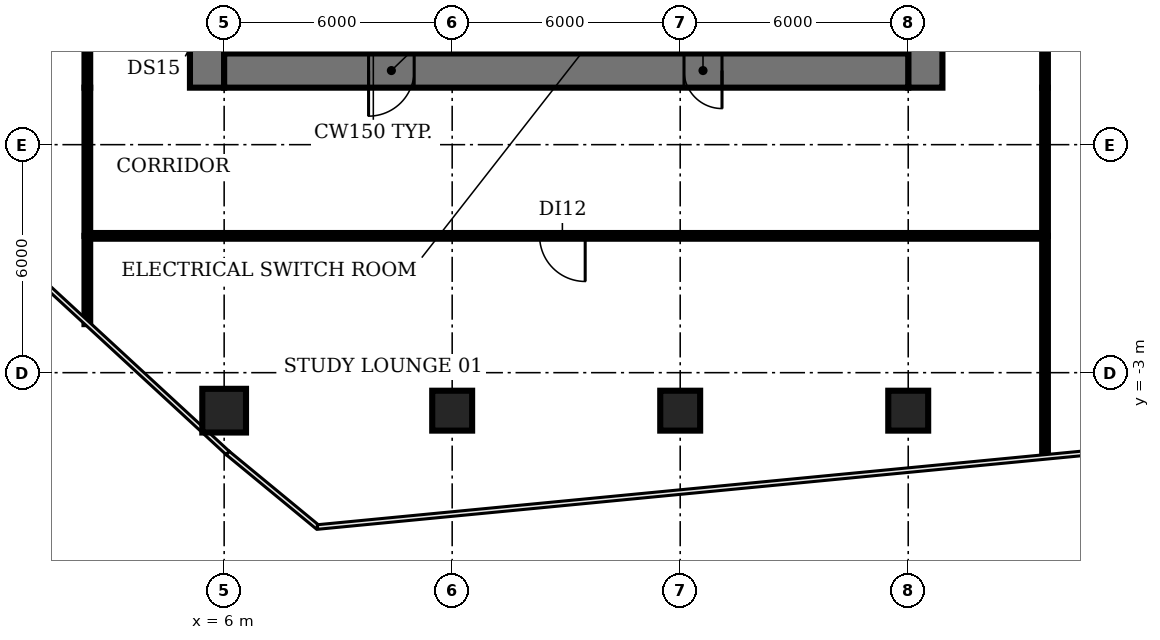
"""IFC4 building model, lengths in metres.
Left out: names, types, materials, properties, quantities, classifications, styles, units other than length and angle.
Written with IfcOpenShell. Run it as: python <this file> out.ifc"""

import sys

from ifc_helpers import new_model, si_unit, direction, frame, frame_2d, origin, origin_2d, place, context, subcontext, project, spatial, rectangle, circle, extrude, element, fill, save


model = new_model("IFC4")
c1 = context("Model", 3, precision=1e-05, world=origin(), true_north=direction((0.0, 1.0)))
c2 = subcontext(c1, "Body", "Model", "MODEL_VIEW")
j1 = project(units=[si_unit("LENGTHUNIT", "METRE"), si_unit("PLANEANGLEUNIT", "RADIAN")], contexts=[c1])
p1 = place(None, origin())
s1 = spatial("IfcSite", under=j1, at=p1, CompositionType="ELEMENT")
p2 = place(p1, origin())
s2 = spatial("IfcBuilding", under=s1, at=p2, CompositionType="ELEMENT")
p3 = place(p2, frame((0.0, 0.0, 75.2)))
s3 = spatial("IfcBuildingStorey", under=s2, at=p3, CompositionType="ELEMENT", Elevation=75.2)
p4 = place(p3, frame((6.0, -4.0, 0.0), z_axis=(0.0, 0.0, 1.0), x_axis=(1.0, 0.0, 0.0)))
e1 = element("IfcColumn", 1, at=p4, inside=s3, PredefinedType="COLUMN", context=c2, shape_type="SweptSolid", body=[
    extrude(circle(Radius=0.575, at=origin_2d()), origin(), (0.0, 0.0, 1.0), 3.2),
])
for number, where, z_axis, x_axis in (
    (2, (12.0, -4.0, 0.0), (0.0, 0.0, 1.0), (1.0, 0.0, 0.0)),
    (3, (18.0, -4.0, 0.0), (0.0, 0.0, 1.0), (1.0, 0.0, 0.0)),
    (4, (24.0, -4.0, 0.0), (0.0, 0.0, 1.0), (1.0, 0.0, 0.0)),
):
    element("IfcColumn", number, at=place(p3, frame(where, z_axis=z_axis, x_axis=x_axis)), inside=s3, PredefinedType="COLUMN", context=c2, shape_type="SweptSolid", body=[
        extrude(rectangle(XDim=1.05, YDim=1.05, at=origin_2d()), origin(), (0.0, 0.0, 1.0), 3.2),
    ])
p5 = place(p3, frame((9.275, 11.825, 0.0), z_axis=(0.0, 0.0, 1.0), x_axis=(0.0, -1.0, 0.0)))
e5 = element("IfcWall", 5, at=p5, inside=s3, PredefinedType="SHEAR", context=c2, shape_type="SweptSolid", body=[
    extrude(rectangle(XDim=6.425, YDim=0.25, at=frame_2d((3.212, 0.0))), origin(), (0.0, 0.0, 1.0), 3.8),
])
p6 = place(p5, frame((5.075, 0.0, 0.0)))
e6 = element("IfcOpeningElement", 6, at=p6, cuts=e5, PredefinedType="OPENING", context=c2, shape_type="SweptSolid", body=[
    extrude(rectangle(XDim=1.0, YDim=2.1, at=frame_2d((0.5, 1.05))), frame((0.0, 0.135, 0.0), z_axis=(0.0, -1.0, 0.0), x_axis=(1.0, 0.0, 0.0)), (0.0, 0.0, 1.0), 0.27),
])
p7 = place(p3, frame((13.5, 5.4, 0.0), z_axis=(0.0, 0.0, 1.0), x_axis=(0.0, 1.0, 0.0)))
e7 = element("IfcWall", 7, at=p7, inside=s3, PredefinedType="SHEAR", context=c2, shape_type="SweptSolid", body=[
    extrude(rectangle(XDim=8.2, YDim=0.2, at=frame_2d((4.1, 0.0))), origin(), (0.0, 0.0, 1.0), 3.8),
])
p8 = place(p7, frame((0.75, 0.0, 0.0)))
e8 = element("IfcOpeningElement", 8, at=p8, cuts=e7, PredefinedType="OPENING", context=c2, shape_type="SweptSolid", body=[
    extrude(rectangle(XDim=1.1, YDim=2.1, at=frame_2d((0.55, 1.05))), frame((0.0, 0.11, 0.0), z_axis=(0.0, -1.0, 0.0), x_axis=(1.0, 0.0, 0.0)), (0.0, 0.0, 1.0), 0.22),
])
p9 = place(p7, frame((3.55, 0.0, 0.0)))
e9 = element("IfcOpeningElement", 9, at=p9, cuts=e7, PredefinedType="OPENING", context=c2, shape_type="SweptSolid", body=[
    extrude(rectangle(XDim=1.1, YDim=2.1, at=frame_2d((0.55, 1.05))), frame((0.0, 0.11, 0.0), z_axis=(0.0, -1.0, 0.0), x_axis=(1.0, 0.0, 0.0)), (0.0, 0.0, 1.0), 0.22),
])
p10 = place(p7, frame((6.35, 0.0, 0.0)))
e10 = element("IfcOpeningElement", 10, at=p10, cuts=e7, PredefinedType="OPENING", context=c2, shape_type="SweptSolid", body=[
    extrude(rectangle(XDim=1.1, YDim=2.1, at=frame_2d((0.55, 1.05))), frame((0.0, 0.11, 0.0), z_axis=(0.0, -1.0, 0.0), x_axis=(1.0, 0.0, 0.0)), (0.0, 0.0, 1.0), 0.22),
])
p11 = place(p3, frame((16.5, 5.4, 0.0), z_axis=(0.0, 0.0, 1.0), x_axis=(0.0, 1.0, 0.0)))
e11 = element("IfcWall", 11, at=p11, inside=s3, PredefinedType="SHEAR", context=c2, shape_type="SweptSolid", body=[
    extrude(rectangle(XDim=8.2, YDim=0.2, at=frame_2d((4.1, 0.0))), origin(), (0.0, 0.0, 1.0), 3.8),
])
p12 = place(p3, frame((20.725, 5.4, 0.0), z_axis=(0.0, 0.0, 1.0), x_axis=(0.0, 1.0, 0.0)))
e12 = element("IfcWall", 12, at=p12, inside=s3, PredefinedType="SHEAR", context=c2, shape_type="SweptSolid", body=[
    extrude(rectangle(XDim=6.3, YDim=0.25, at=frame_2d((3.15, 0.0))), origin(), (0.0, 0.0, 1.0), 3.8),
])
p13 = place(p3, frame((5.55, 4.5, 0.0), z_axis=(0.0, 0.0, 1.0), x_axis=(0.0, 1.0, 0.0)))
e13 = element("IfcWall", 13, at=p13, inside=s3, PredefinedType="SHEAR", context=c2, shape_type="SweptSolid", body=[
    extrude(rectangle(XDim=21.2, YDim=0.9, at=frame_2d((10.6, 0.0))), origin(), (0.0, 0.0, 1.0), 3.8),
])
p14 = place(p13, frame((1.15, 0.0, 0.0)))
e14 = element("IfcOpeningElement", 14, at=p14, cuts=e13, PredefinedType="OPENING", context=c2, shape_type="SweptSolid", body=[
    extrude(rectangle(XDim=1.5, YDim=2.1, at=frame_2d((0.75, 1.05))), frame((0.0, 0.46, 0.0), z_axis=(0.0, -1.0, 0.0), x_axis=(1.0, 0.0, 0.0)), (0.0, 0.0, 1.0), 0.92),
])
p15 = place(p13, frame((7.6, 0.0, 0.0)))
e15 = element("IfcOpeningElement", 15, at=p15, cuts=e13, PredefinedType="OPENING", context=c2, shape_type="SweptSolid", body=[
    extrude(rectangle(XDim=1.2, YDim=2.1, at=frame_2d((0.6, 1.05))), frame((0.0, 0.46, 0.0), z_axis=(0.0, -1.0, 0.0), x_axis=(1.0, 0.0, 0.0)), (0.0, 0.0, 1.0), 0.92),
])
p16 = place(p13, frame((14.15, 0.0, 0.0)))
e16 = element("IfcOpeningElement", 16, at=p16, cuts=e13, PredefinedType="OPENING", context=c2, shape_type="SweptSolid", body=[
    extrude(rectangle(XDim=1.2, YDim=2.1, at=frame_2d((0.6, 1.05))), frame((0.0, 0.46, 0.0), z_axis=(0.0, -1.0, 0.0), x_axis=(1.0, 0.0, 0.0)), (0.0, 0.0, 1.0), 0.92),
])
p17 = place(p3, frame((24.45, 25.7, 0.0), z_axis=(0.0, 0.0, 1.0), x_axis=(0.0, -1.0, 0.0)))
e17 = element("IfcWall", 17, at=p17, inside=s3, PredefinedType="SHEAR", context=c2, shape_type="SweptSolid", body=[
    extrude(rectangle(XDim=21.2, YDim=0.9, at=frame_2d((10.6, 0.0))), origin(), (0.0, 0.0, 1.0), 3.8),
])
p18 = place(p17, frame((18.55, 0.0, 0.0)))
e18 = element("IfcOpeningElement", 18, at=p18, cuts=e17, PredefinedType="OPENING", context=c2, shape_type="SweptSolid", body=[
    extrude(rectangle(XDim=1.5, YDim=2.1, at=frame_2d((0.75, 1.05))), frame((0.0, 0.46, 0.0), z_axis=(0.0, -1.0, 0.0), x_axis=(1.0, 0.0, 0.0)), (0.0, 0.0, 1.0), 0.92),
])
p19 = place(p17, frame((12.45, 0.0, 0.0)))
e19 = element("IfcOpeningElement", 19, at=p19, cuts=e17, PredefinedType="OPENING", context=c2, shape_type="SweptSolid", body=[
    extrude(rectangle(XDim=0.9, YDim=2.1, at=frame_2d((0.45, 1.05))), frame((0.0, 0.46, 0.0), z_axis=(0.0, -1.0, 0.0), x_axis=(1.0, 0.0, 0.0)), (0.0, 0.0, 1.0), 0.92),
])
p20 = place(p17, frame((6.45, 0.0, 0.0)))
e20 = element("IfcOpeningElement", 20, at=p20, cuts=e17, PredefinedType="OPENING", context=c2, shape_type="SweptSolid", body=[
    extrude(rectangle(XDim=2.0, YDim=2.1, at=frame_2d((1.0, 1.05))), frame((0.0, 0.46, 0.0), z_axis=(0.0, -1.0, 0.0), x_axis=(1.0, 0.0, 0.0)), (0.0, 0.0, 1.0), 0.92),
])
p21 = place(p3, frame((24.0, 4.95, 0.0), z_axis=(0.0, 0.0, 1.0), x_axis=(-1.0, 0.0, 0.0)))
e21 = element("IfcWall", 21, at=p21, inside=s3, PredefinedType="SHEAR", context=c2, shape_type="SweptSolid", body=[
    extrude(rectangle(XDim=18.0, YDim=0.9, at=frame_2d((9.0, 0.0))), origin(), (0.0, 0.0, 1.0), 3.8),
])
p22 = place(p21, frame((13.0, 0.0, 0.0)))
e22 = element("IfcOpeningElement", 22, at=p22, cuts=e21, PredefinedType="OPENING", context=c2, shape_type="SweptSolid", body=[
    extrude(rectangle(XDim=1.2, YDim=2.1, at=frame_2d((0.6, 1.05))), frame((0.0, 0.46, 0.0), z_axis=(0.0, -1.0, 0.0), x_axis=(1.0, 0.0, 0.0)), (0.0, 0.0, 1.0), 0.92),
])
p23 = place(p21, frame((4.9, 0.0, 0.0)))
e23 = element("IfcOpeningElement", 23, at=p23, cuts=e21, PredefinedType="OPENING", context=c2, shape_type="SweptSolid", body=[
    extrude(rectangle(XDim=1.0, YDim=2.1, at=frame_2d((0.5, 1.05))), frame((0.0, 0.46, 0.0), z_axis=(0.0, -1.0, 0.0), x_axis=(1.0, 0.0, 0.0)), (0.0, 0.0, 1.0), 0.92),
])
p24 = place(p3, frame((2.4, -1.723, 0.0), z_axis=(0.0, 0.0, 1.0), x_axis=(0.0, 1.0, 0.0)))
e24 = element("IfcWall", 24, at=p24, inside=s3, PredefinedType="PARTITIONING", context=c2, shape_type="SweptSolid", body=[
    extrude(rectangle(XDim=2.323, YDim=0.15, at=frame_2d((1.161, 0.0))), origin(), (0.0, 0.0, 1.0), 2.78),
])
p25 = place(p3, frame((2.4, 0.6, 0.0), z_axis=(0.0, 0.0, 1.0), x_axis=(0.0, 1.0, 0.0)))
e25 = element("IfcWall", 25, at=p25, inside=s3, PredefinedType="PARTITIONING", context=c2, shape_type="SweptSolid", body=[
    extrude(rectangle(XDim=3.9, YDim=0.15, at=frame_2d((1.95, 0.0))), origin(), (0.0, 0.0, 1.0), 2.78),
])
p26 = place(p3, frame((2.4, 4.5, 0.0), z_axis=(0.0, 0.0, 1.0), x_axis=(0.0, 1.0, 0.0)))
e26 = element("IfcWall", 26, at=p26, inside=s3, PredefinedType="PARTITIONING", context=c2, shape_type="SweptSolid", body=[
    extrude(rectangle(XDim=21.2, YDim=0.15, at=frame_2d((10.6, 0.0))), origin(), (0.0, 0.0, 1.0), 2.78),
])
p27 = place(p26, frame((10.8, 0.0, 0.0)))
e27 = element("IfcOpeningElement", 27, at=p27, cuts=e26, PredefinedType="OPENING", context=c2, shape_type="SweptSolid", body=[
    extrude(rectangle(XDim=1.2, YDim=2.1, at=frame_2d((0.6, 1.05))), frame((0.0, 0.085, 0.0), z_axis=(0.0, -1.0, 0.0), x_axis=(1.0, 0.0, 0.0)), (0.0, 0.0, 1.0), 0.17),
])
p28 = place(p3, frame((27.6, -5.17, 0.0), z_axis=(0.0, 0.0, 1.0), x_axis=(0.0, 1.0, 0.0)))
e28 = element("IfcWall", 28, at=p28, inside=s3, PredefinedType="PARTITIONING", context=c2, shape_type="SweptSolid", body=[
    extrude(rectangle(XDim=5.77, YDim=0.15, at=frame_2d((2.885, 0.0))), origin(), (0.0, 0.0, 1.0), 2.78),
])
p29 = place(p3, frame((27.6, 0.6, 0.0), z_axis=(0.0, 0.0, 1.0), x_axis=(-1.0, 0.0, 0.0)))
e29 = element("IfcWall", 29, at=p29, inside=s3, PredefinedType="PARTITIONING", context=c2, shape_type="SweptSolid", body=[
    extrude(rectangle(XDim=25.2, YDim=0.15, at=frame_2d((12.6, 0.0))), origin(), (0.0, 0.0, 1.0), 2.78),
])
p30 = place(p29, frame((12.1, 0.0, 0.0)))
e30 = element("IfcOpeningElement", 30, at=p30, cuts=e29, PredefinedType="OPENING", context=c2, shape_type="SweptSolid", body=[
    extrude(rectangle(XDim=1.2, YDim=2.1, at=frame_2d((0.6, 1.05))), frame((0.0, 0.085, 0.0), z_axis=(0.0, -1.0, 0.0), x_axis=(1.0, 0.0, 0.0)), (0.0, 0.0, 1.0), 0.17),
])
p31 = place(p3, frame((27.6, 0.6, 0.0), z_axis=(0.0, 0.0, 1.0), x_axis=(0.0, 1.0, 0.0)))
e31 = element("IfcWall", 31, at=p31, inside=s3, PredefinedType="PARTITIONING", context=c2, shape_type="SweptSolid", body=[
    extrude(rectangle(XDim=3.9, YDim=0.15, at=frame_2d((1.95, 0.0))), origin(), (0.0, 0.0, 1.0), 2.78),
])
p32 = place(p3, frame((27.6, 15.0, 0.0), z_axis=(0.0, 0.0, 1.0), x_axis=(0.0, -1.0, 0.0)))
e32 = element("IfcWall", 32, at=p32, inside=s3, PredefinedType="PARTITIONING", context=c2, shape_type="SweptSolid", body=[
    extrude(rectangle(XDim=10.5, YDim=0.15, at=frame_2d((5.25, 0.0))), origin(), (0.0, 0.0, 1.0), 2.78),
])
p33 = place(p32, frame((4.8, 0.0, 0.0)))
e33 = element("IfcOpeningElement", 33, at=p33, cuts=e32, PredefinedType="OPENING", context=c2, shape_type="SweptSolid", body=[
    extrude(rectangle(XDim=1.0, YDim=2.1, at=frame_2d((0.5, 1.05))), frame((0.0, 0.085, 0.0), z_axis=(0.0, -1.0, 0.0), x_axis=(1.0, 0.0, 0.0)), (0.0, 0.0, 1.0), 0.17),
])
p34 = place(p22, origin())
e34 = element("IfcDoor", 34, at=p34, inside=s3, OperationType="SINGLE_SWING_RIGHT", PredefinedType="DOOR", context=c2, shape_type="SweptSolid", body=[
    extrude(rectangle(XDim=1.2, YDim=2.1, at=frame_2d((0.6, 1.05))), frame((0.0, 0.025, 0.0), z_axis=(0.0, -1.0, 0.0), x_axis=(1.0, 0.0, 0.0)), (0.0, 0.0, 1.0), 0.05),
])
fill(e22, e34)
p35 = place(p23, origin())
e35 = element("IfcDoor", 35, at=p35, inside=s3, OperationType="SINGLE_SWING_LEFT", PredefinedType="DOOR", context=c2, shape_type="SweptSolid", body=[
    extrude(rectangle(XDim=1.0, YDim=2.1, at=frame_2d((0.5, 1.05))), frame((0.0, -0.39, 0.0), z_axis=(0.0, -1.0, 0.0), x_axis=(1.0, 0.0, 0.0)), (0.0, 0.0, 1.0), 0.05),
])
fill(e23, e35)
p36 = place(p30, origin())
e36 = element("IfcDoor", 36, at=p36, inside=s3, OperationType="SINGLE_SWING_LEFT", PredefinedType="DOOR", context=c2, shape_type="SweptSolid", body=[
    extrude(rectangle(XDim=1.2, YDim=2.1, at=frame_2d((0.6, 1.05))), frame((0.0, 0.025, 0.0), z_axis=(0.0, -1.0, 0.0), x_axis=(1.0, 0.0, 0.0)), (0.0, 0.0, 1.0), 0.05),
])
fill(e30, e36)
save(model, sys.argv[1])
